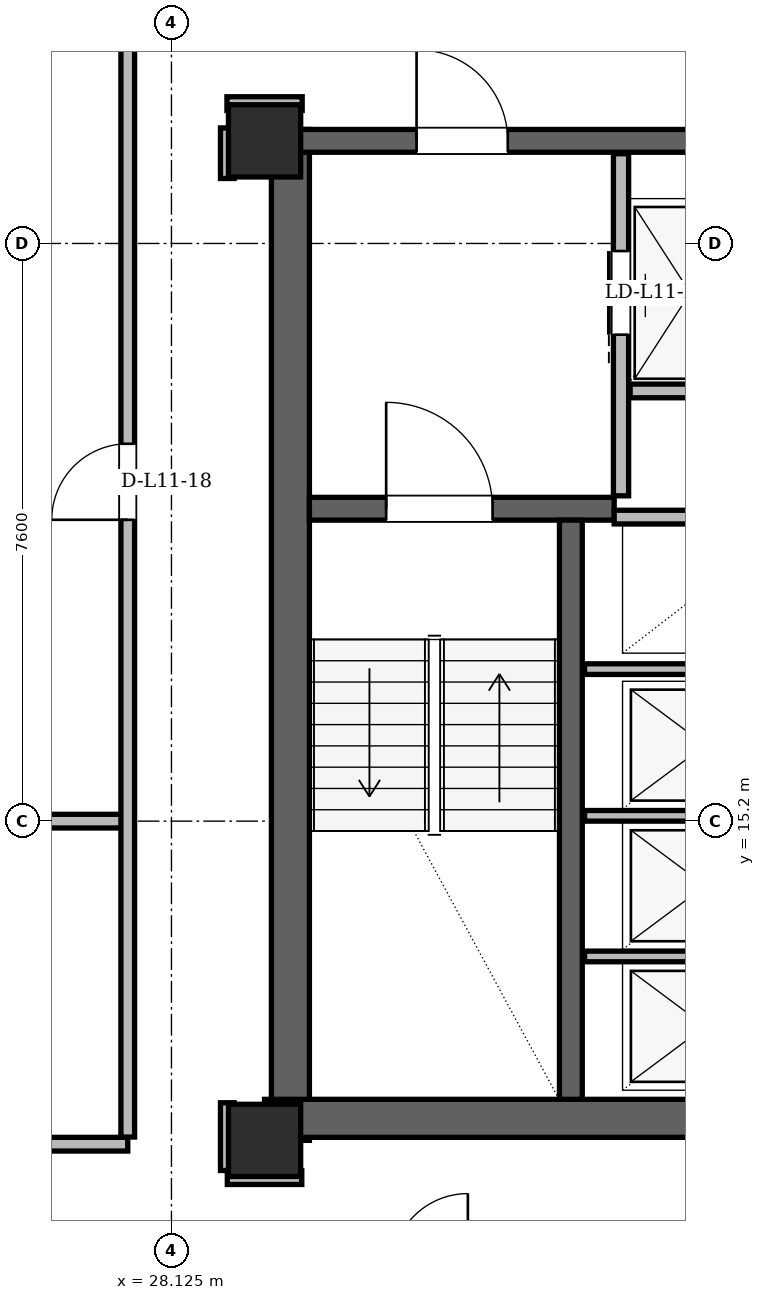
"""IFC4 building model, lengths in metres.
Left out: names, types, materials, properties, quantities, classifications, styles, units other than length and angle.
Written with IfcOpenShell. Run it as: python <this file> out.ifc"""

import sys

from ifc_helpers import new_model, si_unit, direction, frame, frame_2d, origin, origin_2d, place, context, subcontext, project, spatial, rectangle, hollow_rectangle, extrude, element, fill, save


model = new_model("IFC4")
c1 = context("Model", 3, precision=1e-05, world=origin(), true_north=direction((0.0, 1.0)))
c2 = subcontext(c1, "Body", "Model", "MODEL_VIEW")
j1 = project(units=[si_unit("LENGTHUNIT", "METRE"), si_unit("PLANEANGLEUNIT", "RADIAN")], contexts=[c1])
p1 = place(None, origin())
s1 = spatial("IfcSite", under=j1, at=p1, CompositionType="ELEMENT")
p2 = place(p1, origin())
s2 = spatial("IfcBuilding", under=s1, at=p2, CompositionType="ELEMENT")
p3 = place(p2, frame((0.0, 0.0, 45.3)))
s3 = spatial("IfcBuildingStorey", under=s2, at=p3, CompositionType="ELEMENT", Elevation=45.3)
for number, where, z_axis, x_axis in (
    (1, (29.35, 11.0, 0.0), (0.0, 0.0, 1.0), (1.0, 0.0, 0.0)),
    (2, (29.35, 24.15, 0.0), (0.0, 0.0, 1.0), (1.0, 0.0, 0.0)),
):
    element("IfcColumn", number, at=place(p3, frame(where, z_axis=z_axis, x_axis=x_axis)), inside=s3, PredefinedType="COLUMN", context=c2, shape_type="SweptSolid", body=[
        extrude(hollow_rectangle(XDim=0.95, YDim=0.95, WallThickness=0.08, at=origin_2d()), origin(), (0.0, 0.0, 1.0), 3.6),
    ])
p4 = place(p3, frame((29.69, 11.0, 0.0), z_axis=(0.0, 0.0, 1.0), x_axis=(0.0, 1.0, 0.0)))
e3 = element("IfcWall", 3, at=p4, inside=s3, PredefinedType="SHEAR", context=c2, shape_type="SweptSolid", body=[
    extrude(rectangle(XDim=13.3, YDim=0.5, at=frame_2d((6.65, 0.0))), origin(), (0.0, 0.0, 1.0), 3.36),
])
p5 = place(p3, frame((29.35, 11.29, 0.0), z_axis=(0.0, 0.0, 1.0), x_axis=(1.0, 0.0, 0.0)))
e4 = element("IfcWall", 4, at=p5, inside=s3, PredefinedType="SHEAR", context=c2, shape_type="SweptSolid", body=[
    extrude(rectangle(XDim=7.1, YDim=0.5, at=frame_2d((3.55, 0.0))), origin(), (0.0, 0.0, 1.0), 3.36),
])
p6 = place(p3, frame((29.65, 24.15, 0.0), z_axis=(0.0, 0.0, 1.0), x_axis=(1.0, 0.0, 0.0)))
e5 = element("IfcWall", 5, at=p6, inside=s3, PredefinedType="SHEAR", context=c2, shape_type="SweptSolid", body=[
    extrude(rectangle(XDim=15.7, YDim=0.3, at=frame_2d((7.85, 0.0))), origin(), (0.0, 0.0, 1.0), 3.36),
])
p7 = place(p6, frame((1.7, 0.0, 0.0)))
e6 = element("IfcOpeningElement", 6, at=p7, cuts=e5, PredefinedType="OPENING", context=c2, shape_type="SweptSolid", body=[
    extrude(rectangle(XDim=1.2, YDim=2.2, at=frame_2d((0.6, 1.1))), frame((0.0, 0.15, 0.0), z_axis=(0.0, -1.0, 0.0), x_axis=(1.0, 0.0, 0.0)), (0.0, 0.0, 1.0), 0.3),
])
p8 = place(p6, frame((12.8, 0.0, 0.0)))
e7 = element("IfcOpeningElement", 7, at=p8, cuts=e5, PredefinedType="OPENING", context=c2, shape_type="SweptSolid", body=[
    extrude(rectangle(XDim=1.2, YDim=2.2, at=frame_2d((0.6, 1.1))), frame((0.0, 0.15, 0.0), z_axis=(0.0, -1.0, 0.0), x_axis=(1.0, 0.0, 0.0)), (0.0, 0.0, 1.0), 0.3),
])
p9 = place(p6, frame((7.4, 0.0, 0.0)))
e8 = element("IfcOpeningElement", 8, at=p9, cuts=e5, PredefinedType="OPENING", context=c2, shape_type="SweptSolid", body=[
    extrude(rectangle(XDim=0.9, YDim=2.05, at=frame_2d((0.45, 1.025))), frame((0.0, 0.15, 0.0), z_axis=(0.0, -1.0, 0.0), x_axis=(1.0, 0.0, 0.0)), (0.0, 0.0, 1.0), 0.3),
])
p10 = place(p3, frame((29.94, 19.31, 0.0), z_axis=(0.0, 0.0, 1.0), x_axis=(1.0, 0.0, 0.0)))
e9 = element("IfcWall", 9, at=p10, inside=s3, PredefinedType="SHEAR", context=c2, shape_type="SweptSolid", body=[
    extrude(rectangle(XDim=4.01, YDim=0.3, at=frame_2d((2.005, 0.0))), origin(), (0.0, 0.0, 1.0), 3.36),
])
p11 = place(p10, frame((1.01, 0.0, 0.0)))
e10 = element("IfcOpeningElement", 10, at=p11, cuts=e9, PredefinedType="OPENING", context=c2, shape_type="SweptSolid", body=[
    extrude(rectangle(XDim=1.4, YDim=2.2, at=frame_2d((0.7, 1.1))), frame((0.0, 0.15, 0.0), z_axis=(0.0, -1.0, 0.0), x_axis=(1.0, 0.0, 0.0)), (0.0, 0.0, 1.0), 0.3),
])
p12 = place(p3, frame((33.38, 11.54, 0.0), z_axis=(0.0, 0.0, 1.0), x_axis=(0.0, 1.0, 0.0)))
e11 = element("IfcWall", 11, at=p12, inside=s3, PredefinedType="SHEAR", context=c2, shape_type="SweptSolid", body=[
    extrude(rectangle(XDim=7.62, YDim=0.3, at=frame_2d((3.81, 0.0))), origin(), (0.0, 0.0, 1.0), 3.36),
])
p13 = place(p3, frame((30.023, 43.593, 0.0), z_axis=(0.0, 0.0, 1.0), x_axis=(-0.500004112523, -0.866023029405, 0.0)))
e12 = element("IfcWall", 12, at=p13, inside=s3, PredefinedType="SOLIDWALL", context=c2, shape_type="SweptSolid", body=[
    extrude(rectangle(XDim=33.214, YDim=0.34, at=frame_2d((16.607, 0.0))), origin(), (0.0, 0.0, 1.0), 2.494),
])
p14 = place(p13, frame((7.615, 0.0, 0.0)))
e13 = element("IfcOpeningElement", 13, at=p14, cuts=e12, PredefinedType="OPENING", context=c2, shape_type="SweptSolid", body=[
    extrude(rectangle(XDim=1.5, YDim=2.2, at=frame_2d((0.75, 1.1))), frame((0.0, 0.17, 0.0), z_axis=(0.0, -1.0, 0.0), x_axis=(1.0, 0.0, 0.0)), (0.0, 0.0, 1.0), 0.34),
])
p15 = place(p13, frame((25.655, 0.0, 0.0)))
e14 = element("IfcOpeningElement", 14, at=p15, cuts=e12, PredefinedType="OPENING", context=c2, shape_type="SweptSolid", body=[
    extrude(rectangle(XDim=1.3, YDim=2.2, at=frame_2d((0.65, 1.1))), frame((0.0, 0.17, 0.0), z_axis=(0.0, -1.0, 0.0), x_axis=(1.0, 0.0, 0.0)), (0.0, 0.0, 1.0), 0.34),
])
p16 = place(p13, frame((11.292, 0.0, 0.85)))
e15 = element("IfcOpeningElement", 15, at=p16, cuts=e12, PredefinedType="OPENING", context=c2, shape_type="SweptSolid", body=[
    extrude(rectangle(XDim=2.0, YDim=1.534, at=frame_2d((1.0, 0.767))), frame((0.0, 0.17, 0.0), z_axis=(0.0, -1.0, 0.0), x_axis=(1.0, 0.0, 0.0)), (0.0, 0.0, 1.0), 0.34),
])
p17 = place(p13, frame((18.731, 0.0, 0.85)))
e16 = element("IfcOpeningElement", 16, at=p17, cuts=e12, PredefinedType="OPENING", context=c2, shape_type="SweptSolid", body=[
    extrude(rectangle(XDim=1.4, YDim=1.534, at=frame_2d((0.7, 0.767))), frame((0.0, 0.17, 0.0), z_axis=(0.0, -1.0, 0.0), x_axis=(1.0, 0.0, 0.0)), (0.0, 0.0, 1.0), 0.34),
])
p18 = place(p13, frame((30.32, 0.0, 0.85)))
e17 = element("IfcOpeningElement", 17, at=p18, cuts=e12, PredefinedType="OPENING", context=c2, shape_type="SweptSolid", body=[
    extrude(rectangle(XDim=1.8, YDim=1.534, at=frame_2d((0.9, 0.767))), frame((0.0, 0.17, 0.0), z_axis=(0.0, -1.0, 0.0), x_axis=(1.0, 0.0, 0.0)), (0.0, 0.0, 1.0), 0.34),
])
p19 = place(p3, frame((34.04, 19.48, 0.0), z_axis=(0.0, 0.0, 1.0), x_axis=(0.0, 1.0, 0.0)))
e18 = element("IfcWall", 18, at=p19, inside=s3, PredefinedType="PARTITIONING", context=c2, shape_type="SweptSolid", body=[
    extrude(rectangle(XDim=4.5, YDim=0.2, at=frame_2d((2.25, 0.0))), origin(), (0.0, 0.0, 1.0), 2.4),
])
p20 = place(p19, frame((2.12, 0.0, 0.0)))
e19 = element("IfcOpeningElement", 19, at=p20, cuts=e18, PredefinedType="OPENING", context=c2, shape_type="SweptSolid", body=[
    extrude(rectangle(XDim=1.1, YDim=2.2, at=frame_2d((0.55, 1.1))), frame((0.0, 0.1, 0.0), z_axis=(0.0, -1.0, 0.0), x_axis=(1.0, 0.0, 0.0)), (0.0, 0.0, 1.0), 0.2),
])
p21 = place(p3, frame((34.16, 20.86, 0.0), z_axis=(0.0, 0.0, 1.0), x_axis=(1.0, 0.0, 0.0)))
e20 = element("IfcWall", 20, at=p21, inside=s3, PredefinedType="PARTITIONING", context=c2, shape_type="SweptSolid", body=[
    extrude(rectangle(XDim=1.58, YDim=0.18, at=frame_2d((0.79, 0.0))), origin(), (0.0, 0.0, 1.0), 3.36),
])
p22 = place(p3, frame((33.95, 19.2, 0.0), z_axis=(0.0, 0.0, 1.0), x_axis=(1.0, 0.0, 0.0)))
e21 = element("IfcWall", 21, at=p22, inside=s3, PredefinedType="PARTITIONING", context=c2, shape_type="SweptSolid", body=[
    extrude(rectangle(XDim=2.27, YDim=0.18, at=frame_2d((1.135, 0.0))), origin(), (0.0, 0.0, 1.0), 3.36),
])
for number, where, z_axis, x_axis in (
    (22, (33.56, 13.42, 0.0), (0.0, 0.0, 1.0), (1.0, 0.0, 0.0)),
    (23, (33.56, 15.27, 0.0), (0.0, 0.0, 1.0), (1.0, 0.0, 0.0)),
    (24, (33.56, 17.2, 0.0), (0.0, 0.0, 1.0), (1.0, 0.0, 0.0)),
):
    element("IfcWall", number, at=place(p3, frame(where, z_axis=z_axis, x_axis=x_axis)), inside=s3, PredefinedType="PARTITIONING", context=c2, shape_type="SweptSolid", body=[
        extrude(rectangle(XDim=2.66, YDim=0.14, at=frame_2d((1.33, 0.0))), origin(), (0.0, 0.0, 1.0), 3.36),
    ])
p23 = place(p3, frame((28.86, 10.51, 0.0), z_axis=(0.0, 0.0, 1.0), x_axis=(1.0, 0.0, 0.0)))
e25 = element("IfcWall", 25, at=p23, inside=s3, PredefinedType="PARTITIONING", context=c2, shape_type="SweptSolid", body=[
    extrude(rectangle(XDim=0.98, YDim=0.18, at=frame_2d((0.49, 0.0))), origin(), (0.0, 0.0, 1.0), 2.738),
])
p24 = place(p3, frame((19.2, 10.95, 0.0), z_axis=(0.0, 0.0, 1.0), x_axis=(1.0, 0.0, 0.0)))
e26 = element("IfcWall", 26, at=p24, inside=s3, PredefinedType="PARTITIONING", context=c2, shape_type="SweptSolid", body=[
    extrude(rectangle(XDim=8.35, YDim=0.18, at=frame_2d((4.175, 0.0))), origin(), (0.0, 0.0, 1.0), 3.36),
])
p25 = place(p3, frame((13.831, 15.2, 0.0), z_axis=(0.0, 0.0, 1.0), x_axis=(1.0, 0.0, 0.0)))
e27 = element("IfcWall", 27, at=p25, inside=s3, PredefinedType="PARTITIONING", context=c2, shape_type="SweptSolid", body=[
    extrude(rectangle(XDim=13.719, YDim=0.18, at=frame_2d((6.86, 0.0))), origin(), (0.0, 0.0, 1.0), 2.494),
])
p26 = place(p3, frame((28.855, 24.64, 0.0), z_axis=(0.0, 0.0, 1.0), x_axis=(1.0, 0.0, 0.0)))
e28 = element("IfcWall", 28, at=p26, inside=s3, PredefinedType="PARTITIONING", context=c2, shape_type="SweptSolid", body=[
    extrude(rectangle(XDim=0.99, YDim=0.18, at=frame_2d((0.495, 0.0))), origin(), (0.0, 0.0, 1.0), 2.738),
])
p27 = place(p3, frame((27.55, 11.044, 0.0), z_axis=(0.0, 0.0, 1.0), x_axis=(0.0, 1.0, 0.0)))
e29 = element("IfcWall", 29, at=p27, inside=s3, PredefinedType="PARTITIONING", context=c2, shape_type="SweptSolid", body=[
    extrude(rectangle(XDim=27.715, YDim=0.18, at=frame_2d((13.858, 0.0))), origin(), (0.0, 0.0, 1.0), 2.738),
])
p28 = place(p27, frame((8.121, 0.0, 0.0)))
e30 = element("IfcOpeningElement", 30, at=p28, cuts=e29, PredefinedType="OPENING", context=c2, shape_type="SweptSolid", body=[
    extrude(rectangle(XDim=1.0, YDim=2.18, at=frame_2d((0.5, 1.09))), frame((0.0, 0.09, 0.0), z_axis=(0.0, -1.0, 0.0), x_axis=(1.0, 0.0, 0.0)), (0.0, 0.0, 1.0), 0.18),
])
p29 = place(p3, frame((28.86, 10.604, 0.0), z_axis=(0.0, 0.0, 1.0), x_axis=(0.0, 1.0, 0.0)))
e31 = element("IfcWall", 31, at=p29, inside=s3, PredefinedType="PARTITIONING", context=c2, shape_type="SweptSolid", body=[
    extrude(rectangle(XDim=0.891, YDim=0.18, at=frame_2d((0.446, 0.0))), origin(), (0.0, 0.0, 1.0), 2.738),
])
p30 = place(p3, frame((28.86, 23.655, 0.0), z_axis=(0.0, 0.0, 1.0), x_axis=(0.0, 1.0, 0.0)))
e32 = element("IfcWall", 32, at=p30, inside=s3, PredefinedType="PARTITIONING", context=c2, shape_type="SweptSolid", body=[
    extrude(rectangle(XDim=0.665, YDim=0.18, at=frame_2d((0.333, 0.0))), origin(), (0.0, 0.0, 1.0), 3.36),
])
p31 = place(p20, origin())
e33 = element("IfcDoor", 33, at=p31, inside=s3, OperationType="SLIDING_TO_LEFT", PredefinedType="DOOR", context=c2, shape_type="SweptSolid", body=[
    extrude(rectangle(XDim=1.1, YDim=2.2, at=frame_2d((0.55, 1.1))), frame((0.0, 0.025, 0.0), z_axis=(0.0, -1.0, 0.0), x_axis=(1.0, 0.0, 0.0)), (0.0, 0.0, 1.0), 0.05),
])
fill(e19, e33)
p32 = place(p11, origin())
e34 = element("IfcDoor", 34, at=p32, inside=s3, OperationType="SINGLE_SWING_LEFT", PredefinedType="DOOR", context=c2, shape_type="SweptSolid", body=[
    extrude(rectangle(XDim=1.4, YDim=2.2, at=frame_2d((0.7, 1.1))), frame((0.0, 0.025, 0.0), z_axis=(0.0, -1.0, 0.0), x_axis=(1.0, 0.0, 0.0)), (0.0, 0.0, 1.0), 0.05),
])
fill(e10, e34)
p33 = place(p7, origin())
e35 = element("IfcDoor", 35, at=p33, inside=s3, OperationType="SINGLE_SWING_LEFT", PredefinedType="DOOR", context=c2, shape_type="SweptSolid", body=[
    extrude(rectangle(XDim=1.2, YDim=2.2, at=frame_2d((0.6, 1.1))), frame((0.0, 0.025, 0.0), z_axis=(0.0, -1.0, 0.0), x_axis=(1.0, 0.0, 0.0)), (0.0, 0.0, 1.0), 0.05),
])
fill(e6, e35)
p34 = place(p28, origin())
e36 = element("IfcDoor", 36, at=p34, inside=s3, OperationType="SINGLE_SWING_LEFT", PredefinedType="DOOR", context=c2, shape_type="SweptSolid", body=[
    extrude(rectangle(XDim=1.0, YDim=2.18, at=frame_2d((0.5, 1.09))), frame((0.0, 0.025, 0.0), z_axis=(0.0, -1.0, 0.0), x_axis=(1.0, 0.0, 0.0)), (0.0, 0.0, 1.0), 0.05),
])
fill(e30, e36)
save(model, sys.argv[1])
